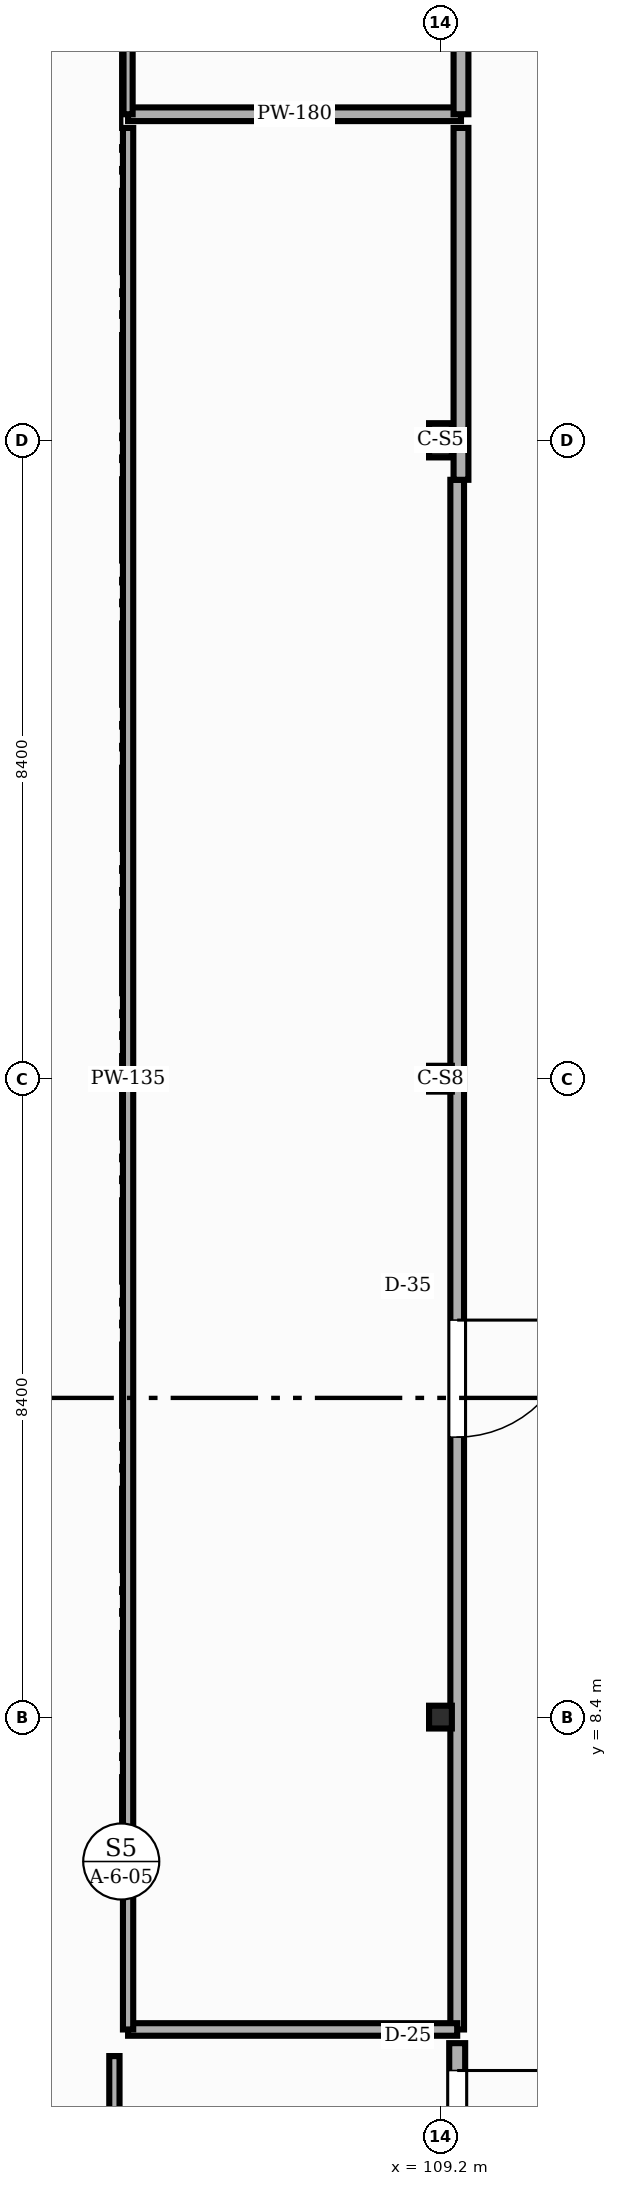
"""IFC4 building model, lengths in metres.
Left out: names, types, materials, properties, quantities, classifications, styles, units other than length and angle.
Written with IfcOpenShell. Run it as: python <this file> out.ifc"""

import sys

from ifc_helpers import new_model, si_unit, direction, frame, frame_2d, origin, origin_2d, place, context, subcontext, project, spatial, rectangle, i_section, extrude, element, fill, save


model = new_model("IFC4")
c1 = context("Model", 3, precision=1e-05, world=origin(), true_north=direction((0.0, 1.0)))
c2 = subcontext(c1, "Body", "Model", "MODEL_VIEW")
j1 = project(units=[si_unit("LENGTHUNIT", "METRE"), si_unit("PLANEANGLEUNIT", "RADIAN")], contexts=[c1])
p1 = place(None, origin())
s1 = spatial("IfcSite", under=j1, at=p1, CompositionType="ELEMENT")
p2 = place(p1, origin())
s2 = spatial("IfcBuilding", under=s1, at=p2, CompositionType="ELEMENT")
p3 = place(p2, origin())
s3 = spatial("IfcBuildingStorey", under=s2, at=p3, CompositionType="ELEMENT", Elevation=0.0)
p4 = place(p3, frame((109.2, 8.4, 0.0), z_axis=(0.0, 0.0, 1.0), x_axis=(1.0, 0.0, 0.0)))
e1 = element("IfcColumn", 1, at=p4, inside=s3, PredefinedType="COLUMN", context=c2, shape_type="SweptSolid", body=[
    extrude(i_section(OverallWidth=0.3, OverallDepth=0.3, WebThickness=0.011, FlangeThickness=0.019, FilletRadius=0.027, at=origin_2d()), origin(), (0.0, 0.0, 1.0), 5.4),
])
p5 = place(p3, frame((109.2, 16.8, 0.0), z_axis=(0.0, 0.0, 1.0), x_axis=(1.0, 0.0, 0.0)))
e2 = element("IfcColumn", 2, at=p5, inside=s3, PredefinedType="COLUMN", context=c2, shape_type="SweptSolid", body=[
    extrude(i_section(OverallWidth=0.3, OverallDepth=0.34, WebThickness=0.012, FlangeThickness=0.021, FilletRadius=0.027, at=origin_2d()), origin(), (0.0, 0.0, 1.0), 5.4),
])
p6 = place(p3, frame((109.2, 25.2, 0.0), z_axis=(0.0, 0.0, 1.0), x_axis=(1.0, 0.0, 0.0)))
e3 = element("IfcColumn", 3, at=p6, inside=s3, PredefinedType="COLUMN", context=c2, shape_type="SweptSolid", body=[
    extrude(i_section(OverallWidth=0.3, OverallDepth=0.45, WebThickness=0.014, FlangeThickness=0.026, FilletRadius=0.027, at=origin_2d()), origin(), (0.0, 0.0, 1.0), 5.4),
])
p7 = place(p3, frame((109.47, 29.49, -0.004), z_axis=(0.0, 0.0, 1.0), x_axis=(-1.0, 0.0, 0.0)))
e4 = element("IfcWall", 4, at=p7, inside=s3, PredefinedType="STANDARD", context=c2, shape_type="SweptSolid", body=[
    extrude(rectangle(XDim=4.38, YDim=0.18, at=frame_2d((2.19, 0.0))), origin(), (0.0, 0.0, 1.0), 5.179),
])
p8 = place(p3, frame((105.09, 29.49, -0.004), z_axis=(0.0, 0.0, 1.0), x_axis=(0.0, 1.0, 0.0)))
e5 = element("IfcWall", 5, at=p8, inside=s3, PredefinedType="STANDARD", context=c2, shape_type="SweptSolid", body=[
    extrude(rectangle(XDim=25.02, YDim=0.12, at=frame_2d((12.51, 0.0))), origin(), (0.0, 0.0, 1.0), 5.179),
])
p9 = place(p3, frame((109.47, 54.51, -0.004), z_axis=(0.0, 0.0, 1.0), x_axis=(0.0, -1.0, 0.0)))
e6 = element("IfcWall", 6, at=p9, inside=s3, PredefinedType="STANDARD", context=c2, shape_type="SweptSolid", body=[
    extrude(rectangle(XDim=25.02, YDim=0.195, at=frame_2d((12.51, 0.0))), origin(), (0.0, 0.0, 1.0), 4.811),
])
p10 = place(p9, frame((8.057, 0.0, 0.0)))
e7 = element("IfcOpeningElement", 7, at=p10, cuts=e6, PredefinedType="OPENING", context=c2, shape_type="SweptSolid", body=[
    extrude(rectangle(XDim=1.4, YDim=2.3, at=frame_2d((0.7, 1.15))), frame((0.0, 0.107, 0.0), z_axis=(0.0, -1.0, 0.0), x_axis=(1.0, 0.0, 0.0)), (0.0, 0.0, 1.0), 0.215),
])
p11 = place(p3, frame((109.42, 24.68, -0.004), z_axis=(0.0, 0.0, 1.0), x_axis=(0.0, -1.0, 0.0)))
e8 = element("IfcWall", 8, at=p11, inside=s3, PredefinedType="STANDARD", context=c2, shape_type="SweptSolid", body=[
    extrude(rectangle(XDim=20.39, YDim=0.18, at=frame_2d((10.195, 0.0))), origin(), (0.0, 0.0, 1.0), 4.761),
])
p12 = place(p11, frame((11.056, 0.0, 0.0)))
e9 = element("IfcOpeningElement", 9, at=p12, cuts=e8, PredefinedType="OPENING", context=c2, shape_type="SweptSolid", body=[
    extrude(rectangle(XDim=1.54, YDim=2.3, at=frame_2d((0.77, 1.15))), frame((0.0, 0.1, 0.0), z_axis=(0.0, -1.0, 0.0), x_axis=(1.0, 0.0, 0.0)), (0.0, 0.0, 1.0), 0.2),
])
p13 = place(p3, frame((109.42, 4.29, -0.004), z_axis=(0.0, 0.0, 1.0), x_axis=(-1.0, 0.0, 0.0)))
e10 = element("IfcWall", 10, at=p13, inside=s3, PredefinedType="STANDARD", context=c2, shape_type="SweptSolid", body=[
    extrude(rectangle(XDim=4.33, YDim=0.165, at=frame_2d((2.165, 0.0))), origin(), (0.0, 0.0, 1.0), 5.179),
])
p14 = place(p3, frame((105.09, 4.29, -0.004), z_axis=(0.0, 0.0, 1.0), x_axis=(0.0, 1.0, 0.0)))
e11 = element("IfcWall", 11, at=p14, inside=s3, PredefinedType="STANDARD", context=c2, shape_type="SweptSolid", body=[
    extrude(rectangle(XDim=25.02, YDim=0.135, at=frame_2d((12.51, 0.0))), origin(), (0.0, 0.0, 1.0), 5.179),
])
p15 = place(p3, frame((109.47, 29.31, -0.004), z_axis=(0.0, 0.0, 1.0), x_axis=(0.0, -1.0, 0.0)))
e12 = element("IfcWall", 12, at=p15, inside=s3, PredefinedType="STANDARD", context=c2, shape_type="SweptSolid", body=[
    extrude(rectangle(XDim=4.63, YDim=0.195, at=frame_2d((2.315, 0.0))), origin(), (0.0, 0.0, 1.0), 4.761),
])
p16 = place(p3, frame((104.91, 3.94, -0.004), z_axis=(0.0, 0.0, 1.0), x_axis=(0.0, -1.0, 0.0)))
e13 = element("IfcWall", 13, at=p16, inside=s3, PredefinedType="STANDARD", context=c2, shape_type="SweptSolid", body=[
    extrude(rectangle(XDim=1.269, YDim=0.135, at=frame_2d((0.635, 0.0))), origin(), (0.0, 0.0, 1.0), 5.179),
])
p17 = place(p3, frame((109.42, 4.11, -0.004), z_axis=(0.0, 0.0, 1.0), x_axis=(0.0, -1.0, 0.0)))
e14 = element("IfcWall", 14, at=p17, inside=s3, PredefinedType="STANDARD", context=c2, shape_type="SweptSolid", body=[
    extrude(rectangle(XDim=3.69, YDim=0.21, at=frame_2d((1.845, 0.0))), origin(), (0.0, 0.0, 1.0), 4.891),
])
p18 = place(p17, frame((0.36, 0.0, 0.0)))
e15 = element("IfcOpeningElement", 15, at=p18, cuts=e14, PredefinedType="OPENING", context=c2, shape_type="SweptSolid", body=[
    extrude(rectangle(XDim=1.4, YDim=2.22, at=frame_2d((0.7, 1.11))), frame((0.0, 0.115, 0.0), z_axis=(0.0, -1.0, 0.0), x_axis=(1.0, 0.0, 0.0)), (0.0, 0.0, 1.0), 0.23),
])
p19 = place(p12, origin())
e16 = element("IfcDoor", 16, at=p19, inside=s3, OperationType="SINGLE_SWING_LEFT", PredefinedType="DOOR", context=c2, shape_type="SweptSolid", body=[
    extrude(rectangle(XDim=1.54, YDim=2.3, at=frame_2d((0.77, 1.15))), frame((0.0, 0.025, 0.0), z_axis=(0.0, -1.0, 0.0), x_axis=(1.0, 0.0, 0.0)), (0.0, 0.0, 1.0), 0.05),
])
fill(e9, e16)
p20 = place(p18, origin())
e17 = element("IfcDoor", 17, at=p20, inside=s3, OperationType="SINGLE_SWING_LEFT", PredefinedType="DOOR", context=c2, shape_type="SweptSolid", body=[
    extrude(rectangle(XDim=1.4, YDim=2.22, at=frame_2d((0.7, 1.11))), frame((0.0, 0.025, 0.0), z_axis=(0.0, -1.0, 0.0), x_axis=(1.0, 0.0, 0.0)), (0.0, 0.0, 1.0), 0.05),
])
fill(e15, e17)
save(model, sys.argv[1])
